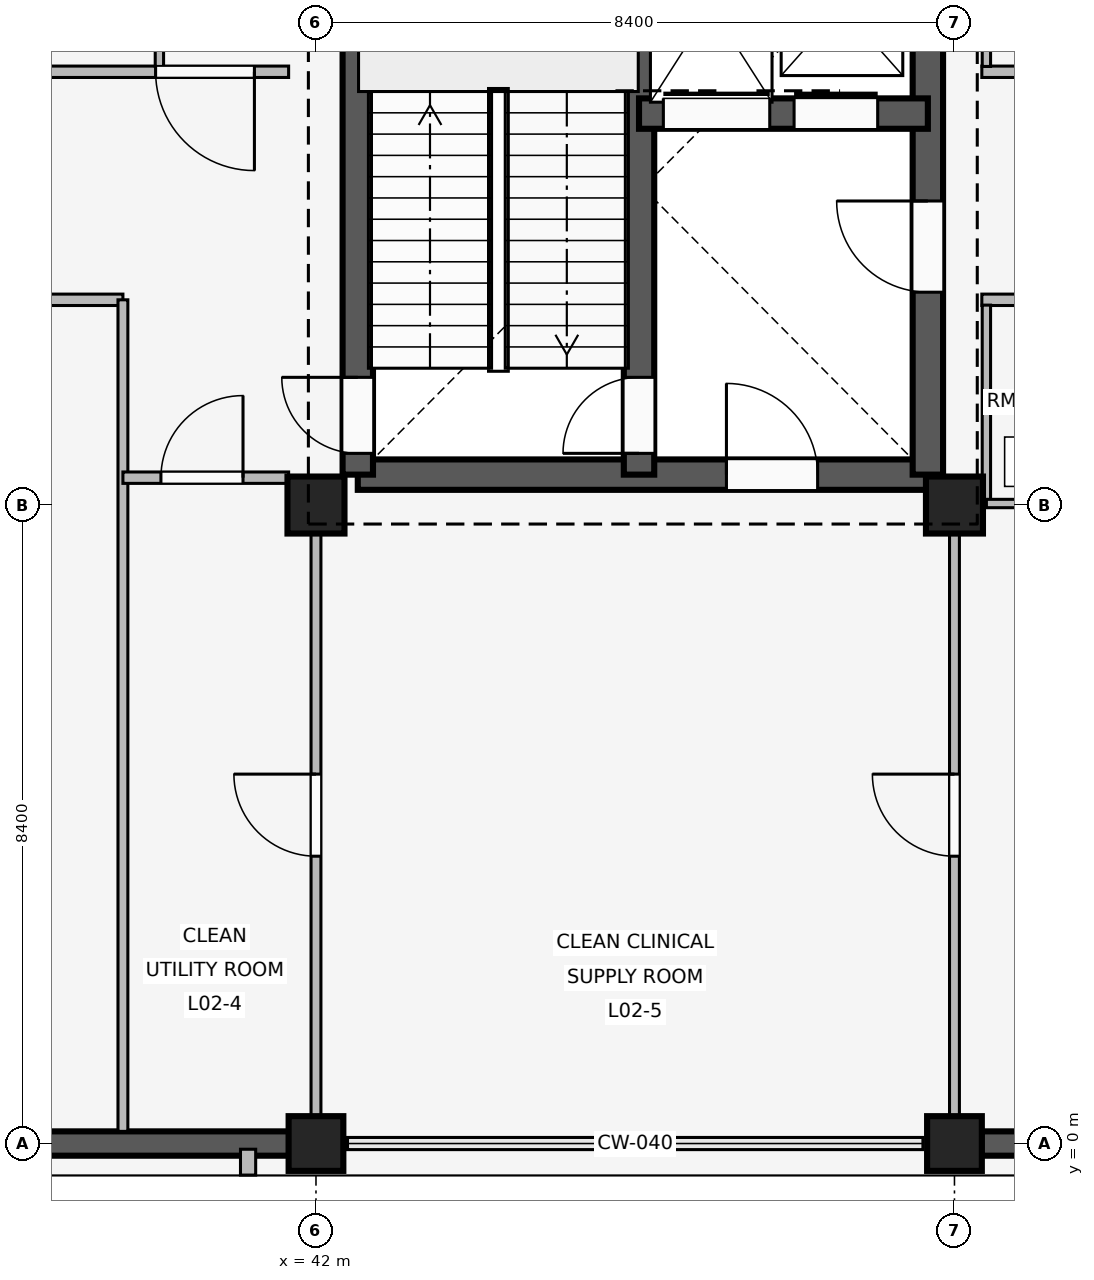
"""IFC4 building model, lengths in metres.
Left out: names, types, materials, properties, quantities, classifications, styles, units other than length and angle.
Written with IfcOpenShell. Run it as: python <this file> out.ifc"""

import sys

from ifc_helpers import new_model, si_unit, direction, frame, frame_2d, origin, origin_2d, place, context, subcontext, project, spatial, rectangle, extrude, element, fill, save


model = new_model("IFC4")
c1 = context("Model", 3, precision=1e-05, world=origin(), true_north=direction((0.0, 1.0)))
c2 = subcontext(c1, "Body", "Model", "MODEL_VIEW")
j1 = project(units=[si_unit("LENGTHUNIT", "METRE"), si_unit("PLANEANGLEUNIT", "RADIAN")], contexts=[c1])
p1 = place(None, origin())
s1 = spatial("IfcSite", under=j1, at=p1, CompositionType="ELEMENT")
p2 = place(p1, origin())
s2 = spatial("IfcBuilding", under=s1, at=p2, CompositionType="ELEMENT")
p3 = place(p2, frame((0.0, 0.0, 8.1)))
s3 = spatial("IfcBuildingStorey", under=s2, at=p3, CompositionType="ELEMENT", Elevation=8.1)
p4 = place(p3, frame((42.0, 0.0, 0.0), z_axis=(0.0, 0.0, 1.0), x_axis=(1.0, 0.0, 0.0)))
e1 = element("IfcColumn", 1, at=p4, inside=s3, PredefinedType="COLUMN", context=c2, shape_type="SweptSolid", body=[
    extrude(rectangle(XDim=0.72, YDim=0.72, at=origin_2d()), origin(), (0.0, 0.0, 1.0), 4.8),
])
p5 = place(p3, frame((42.0, 8.4, 0.0), z_axis=(0.0, 0.0, 1.0), x_axis=(1.0, 0.0, 0.0)))
e2 = element("IfcColumn", 2, at=p5, inside=s3, PredefinedType="COLUMN", context=c2, shape_type="SweptSolid", body=[
    extrude(rectangle(XDim=0.75, YDim=0.75, at=origin_2d()), origin(), (0.0, 0.0, 1.0), 4.8),
])
p6 = place(p3, frame((50.4, 0.0, 0.0), z_axis=(0.0, 0.0, 1.0), x_axis=(1.0, 0.0, 0.0)))
e3 = element("IfcColumn", 3, at=p6, inside=s3, PredefinedType="COLUMN", context=c2, shape_type="SweptSolid", body=[
    extrude(rectangle(XDim=0.72, YDim=0.72, at=origin_2d()), origin(), (0.0, 0.0, 1.0), 4.8),
])
p7 = place(p3, frame((50.4, 8.4, 0.0), z_axis=(0.0, 0.0, 1.0), x_axis=(1.0, 0.0, 0.0)))
e4 = element("IfcColumn", 4, at=p7, inside=s3, PredefinedType="COLUMN", context=c2, shape_type="SweptSolid", body=[
    extrude(rectangle(XDim=0.75, YDim=0.75, at=origin_2d()), origin(), (0.0, 0.0, 1.0), 4.8),
])
p8 = place(p3, frame((41.645, 0.0, 0.0), z_axis=(0.0, 0.0, 1.0), x_axis=(-1.0, 0.0, 0.0)))
e5 = element("IfcWall", 5, at=p8, inside=s3, PredefinedType="SOLIDWALL", context=c2, shape_type="SweptSolid", body=[
    extrude(rectangle(XDim=7.69, YDim=0.32, at=frame_2d((3.845, 0.0))), origin(), (0.0, 0.0, 1.0), 3.86),
])
p9 = place(p8, frame((5.091, 0.0, 0.85)))
e6 = element("IfcOpeningElement", 6, at=p9, cuts=e5, PredefinedType="OPENING", context=c2, shape_type="SweptSolid", body=[
    extrude(rectangle(XDim=1.66, YDim=1.95, at=frame_2d((0.83, 0.975))), frame((0.0, 0.17, 0.0), z_axis=(0.0, -1.0, 0.0), x_axis=(1.0, 0.0, 0.0)), (0.0, 0.0, 1.0), 0.34),
])
p10 = place(p3, frame((41.107, -0.075, 0.0), z_axis=(0.0, 0.0, 1.0), x_axis=(0.0, -1.0, 0.0)))
e7 = element("IfcWall", 7, at=p10, inside=s3, PredefinedType="ELEMENTEDWALL", context=c2, shape_type="SweptSolid", body=[
    extrude(rectangle(XDim=0.34, YDim=0.2, at=frame_2d((0.17, 0.0))), origin(), (0.0, 0.0, 1.0), 3.84),
])
p11 = place(p3, frame((58.445, 0.0, 0.0), z_axis=(0.0, 0.0, 1.0), x_axis=(-1.0, 0.0, 0.0)))
e8 = element("IfcWall", 8, at=p11, inside=s3, PredefinedType="SOLIDWALL", context=c2, shape_type="SweptSolid", body=[
    extrude(rectangle(XDim=7.69, YDim=0.32, at=frame_2d((3.845, 0.0))), origin(), (0.0, 0.0, 1.0), 3.86),
])
p12 = place(p11, frame((0.929, 0.0, 0.85)))
e9 = element("IfcOpeningElement", 9, at=p12, cuts=e8, PredefinedType="OPENING", context=c2, shape_type="SweptSolid", body=[
    extrude(rectangle(XDim=1.68, YDim=2.05, at=frame_2d((0.84, 1.025))), frame((0.0, 0.17, 0.0), z_axis=(0.0, -1.0, 0.0), x_axis=(1.0, 0.0, 0.0)), (0.0, 0.0, 1.0), 0.34),
])
p13 = place(p11, frame((5.081, 0.0, 0.85)))
e10 = element("IfcOpeningElement", 10, at=p13, cuts=e8, PredefinedType="OPENING", context=c2, shape_type="SweptSolid", body=[
    extrude(rectangle(XDim=1.68, YDim=2.05, at=frame_2d((0.84, 1.025))), frame((0.0, 0.17, 0.0), z_axis=(0.0, -1.0, 0.0), x_axis=(1.0, 0.0, 0.0)), (0.0, 0.0, 1.0), 0.34),
])
p14 = place(p3, frame((42.55, 8.8, 0.0), z_axis=(0.0, 0.0, 1.0), x_axis=(1.0, 0.0, 0.0)))
e11 = element("IfcWall", 11, at=p14, inside=s3, PredefinedType="SHEAR", context=c2, shape_type="SweptSolid", body=[
    extrude(rectangle(XDim=7.5, YDim=0.4, at=frame_2d((3.75, 0.0))), origin(), (0.0, 0.0, 1.0), 4.52),
])
p15 = place(p14, frame((4.85, 0.0, 0.0)))
e12 = element("IfcOpeningElement", 12, at=p15, cuts=e11, PredefinedType="OPENING", context=c2, shape_type="SweptSolid", body=[
    extrude(rectangle(XDim=1.2, YDim=2.2, at=frame_2d((0.6, 1.1))), frame((0.0, 0.21, 0.0), z_axis=(0.0, -1.0, 0.0), x_axis=(1.0, 0.0, 0.0)), (0.0, 0.0, 1.0), 0.42),
])
p16 = place(p3, frame((42.55, 8.8, 0.0), z_axis=(0.0, 0.0, 1.0), x_axis=(0.0, 1.0, 0.0)))
e13 = element("IfcWall", 13, at=p16, inside=s3, PredefinedType="SHEAR", context=c2, shape_type="SweptSolid", body=[
    extrude(rectangle(XDim=7.55, YDim=0.4, at=frame_2d((3.775, 0.0))), origin(), (0.0, 0.0, 1.0), 4.52),
])
p17 = place(p16, frame((0.28, 0.0, 0.0)))
e14 = element("IfcOpeningElement", 14, at=p17, cuts=e13, PredefinedType="OPENING", context=c2, shape_type="SweptSolid", body=[
    extrude(rectangle(XDim=1.0, YDim=2.15, at=frame_2d((0.5, 1.075))), frame((0.0, 0.21, 0.0), z_axis=(0.0, -1.0, 0.0), x_axis=(1.0, 0.0, 0.0)), (0.0, 0.0, 1.0), 0.42),
])
p18 = place(p3, frame((50.05, 8.8, 0.0), z_axis=(0.0, 0.0, 1.0), x_axis=(0.0, 1.0, 0.0)))
e15 = element("IfcWall", 15, at=p18, inside=s3, PredefinedType="SHEAR", context=c2, shape_type="SweptSolid", body=[
    extrude(rectangle(XDim=7.55, YDim=0.4, at=frame_2d((3.775, 0.0))), origin(), (0.0, 0.0, 1.0), 4.52),
])
p19 = place(p18, frame((2.4, 0.0, 0.0)))
e16 = element("IfcOpeningElement", 16, at=p19, cuts=e15, PredefinedType="OPENING", context=c2, shape_type="SweptSolid", body=[
    extrude(rectangle(XDim=1.2, YDim=2.2, at=frame_2d((0.6, 1.1))), frame((0.0, 0.21, 0.0), z_axis=(0.0, -1.0, 0.0), x_axis=(1.0, 0.0, 0.0)), (0.0, 0.0, 1.0), 0.42),
])
p20 = place(p3, frame((46.25, 8.8, 0.0), z_axis=(0.0, 0.0, 1.0), x_axis=(0.0, 1.0, 0.0)))
e17 = element("IfcWall", 17, at=p20, inside=s3, PredefinedType="SHEAR", context=c2, shape_type="SweptSolid", body=[
    extrude(rectangle(XDim=7.55, YDim=0.4, at=frame_2d((3.775, 0.0))), origin(), (0.0, 0.0, 1.0), 4.52),
])
p21 = place(p20, frame((0.28, 0.0, 0.0)))
e18 = element("IfcOpeningElement", 18, at=p21, cuts=e17, PredefinedType="OPENING", context=c2, shape_type="SweptSolid", body=[
    extrude(rectangle(XDim=1.0, YDim=2.15, at=frame_2d((0.5, 1.075))), frame((0.0, 0.21, 0.0), z_axis=(0.0, -1.0, 0.0), x_axis=(1.0, 0.0, 0.0)), (0.0, 0.0, 1.0), 0.42),
])
p22 = place(p3, frame((46.25, 13.55, 0.0), z_axis=(0.0, 0.0, 1.0), x_axis=(1.0, 0.0, 0.0)))
e19 = element("IfcWall", 19, at=p22, inside=s3, PredefinedType="SHEAR", context=c2, shape_type="SweptSolid", body=[
    extrude(rectangle(XDim=3.8, YDim=0.4, at=frame_2d((1.9, 0.0))), origin(), (0.0, 0.0, 1.0), 4.52),
])
p23 = place(p22, frame((0.32, 0.0, 0.0)))
e20 = element("IfcOpeningElement", 20, at=p23, cuts=e19, PredefinedType="OPENING", context=c2, shape_type="SweptSolid", body=[
    extrude(rectangle(XDim=1.4, YDim=2.25, at=frame_2d((0.7, 1.125))), frame((0.0, 0.21, 0.0), z_axis=(0.0, -1.0, 0.0), x_axis=(1.0, 0.0, 0.0)), (0.0, 0.0, 1.0), 0.42),
])
p24 = place(p22, frame((2.04, 0.0, 0.0)))
e21 = element("IfcOpeningElement", 21, at=p24, cuts=e19, PredefinedType="OPENING", context=c2, shape_type="SweptSolid", body=[
    extrude(rectangle(XDim=1.1, YDim=2.15, at=frame_2d((0.55, 1.075))), frame((0.0, 0.21, 0.0), z_axis=(0.0, -1.0, 0.0), x_axis=(1.0, 0.0, 0.0)), (0.0, 0.0, 1.0), 0.42),
])
p25 = place(p3, frame((33.68, 11.1, 0.0), z_axis=(0.0, 0.0, 1.0), x_axis=(1.0, 0.0, 0.0)))
e22 = element("IfcWall", 22, at=p25, inside=s3, PredefinedType="PARTITIONING", context=c2, shape_type="SweptSolid", body=[
    extrude(rectangle(XDim=5.78, YDim=0.15, at=frame_2d((2.89, 0.0))), origin(), (0.0, 0.0, 1.0), 3.84),
])
p26 = place(p25, frame((2.38, 0.0, 0.0)))
e23 = element("IfcOpeningElement", 23, at=p26, cuts=e22, PredefinedType="OPENING", context=c2, shape_type="SweptSolid", body=[
    extrude(rectangle(XDim=1.25, YDim=2.2, at=frame_2d((0.625, 1.1))), frame((0.0, 0.085, 0.0), z_axis=(0.0, -1.0, 0.0), x_axis=(1.0, 0.0, 0.0)), (0.0, 0.0, 1.0), 0.17),
])
p27 = place(p3, frame((39.46, 0.16, 0.0), z_axis=(0.0, 0.0, 1.0), x_axis=(0.0, 1.0, 0.0)))
e24 = element("IfcWall", 24, at=p27, inside=s3, PredefinedType="PARTITIONING", context=c2, shape_type="SweptSolid", body=[
    extrude(rectangle(XDim=10.94, YDim=0.13, at=frame_2d((5.47, 0.0))), origin(), (0.0, 0.0, 1.0), 3.84),
])
p28 = place(p3, frame((39.46, 8.76, 0.0), z_axis=(0.0, 0.0, 1.0), x_axis=(1.0, 0.0, 0.0)))
e25 = element("IfcWall", 25, at=p28, inside=s3, PredefinedType="PARTITIONING", context=c2, shape_type="SweptSolid", body=[
    extrude(rectangle(XDim=2.18, YDim=0.15, at=frame_2d((1.09, 0.0))), origin(), (0.0, 0.0, 1.0), 3.84),
])
p29 = place(p28, frame((0.5, 0.0, 0.0)))
e26 = element("IfcOpeningElement", 26, at=p29, cuts=e25, PredefinedType="OPENING", context=c2, shape_type="SweptSolid", body=[
    extrude(rectangle(XDim=1.08, YDim=2.15, at=frame_2d((0.54, 1.075))), frame((0.0, 0.085, 0.0), z_axis=(0.0, -1.0, 0.0), x_axis=(1.0, 0.0, 0.0)), (0.0, 0.0, 1.0), 0.17),
])
p30 = place(p3, frame((41.64, 14.1, 0.0), z_axis=(0.0, 0.0, 1.0), x_axis=(-1.0, 0.0, 0.0)))
e27 = element("IfcWall", 27, at=p30, inside=s3, PredefinedType="PARTITIONING", context=c2, shape_type="SweptSolid", body=[
    extrude(rectangle(XDim=7.96, YDim=0.15, at=frame_2d((3.98, 0.0))), origin(), (0.0, 0.0, 1.0), 3.84),
])
p31 = place(p30, frame((0.45, 0.0, 0.0)))
e28 = element("IfcOpeningElement", 28, at=p31, cuts=e27, PredefinedType="OPENING", context=c2, shape_type="SweptSolid", body=[
    extrude(rectangle(XDim=1.3, YDim=2.25, at=frame_2d((0.65, 1.125))), frame((0.0, 0.085, 0.0), z_axis=(0.0, -1.0, 0.0), x_axis=(1.0, 0.0, 0.0)), (0.0, 0.0, 1.0), 0.17),
])
p32 = place(p30, frame((4.15, 0.0, 0.0)))
e29 = element("IfcOpeningElement", 29, at=p32, cuts=e27, PredefinedType="OPENING", context=c2, shape_type="SweptSolid", body=[
    extrude(rectangle(XDim=1.3, YDim=2.25, at=frame_2d((0.65, 1.125))), frame((0.0, 0.085, 0.0), z_axis=(0.0, -1.0, 0.0), x_axis=(1.0, 0.0, 0.0)), (0.0, 0.0, 1.0), 0.17),
])
p33 = place(p3, frame((39.94, 14.17, 0.0), z_axis=(0.0, 0.0, 1.0), x_axis=(0.0, 1.0, 0.0)))
e30 = element("IfcWall", 30, at=p33, inside=s3, PredefinedType="PARTITIONING", context=c2, shape_type="SweptSolid", body=[
    extrude(rectangle(XDim=2.61, YDim=0.11, at=frame_2d((1.305, 0.0))), origin(), (0.0, 0.0, 1.0), 3.84),
])
p34 = place(p3, frame((42.0, 0.14, 0.0), z_axis=(0.0, 0.0, 1.0), x_axis=(0.0, 1.0, 0.0)))
e31 = element("IfcWall", 31, at=p34, inside=s3, PredefinedType="PARTITIONING", context=c2, shape_type="SweptSolid", body=[
    extrude(rectangle(XDim=8.21, YDim=0.13, at=frame_2d((4.105, 0.0))), origin(), (0.0, 0.0, 1.0), 3.84),
])
p35 = place(p34, frame((3.64, 0.0, 0.0)))
e32 = element("IfcOpeningElement", 32, at=p35, cuts=e31, PredefinedType="OPENING", context=c2, shape_type="SweptSolid", body=[
    extrude(rectangle(XDim=1.08, YDim=2.15, at=frame_2d((0.54, 1.075))), frame((0.0, 0.075, 0.0), z_axis=(0.0, -1.0, 0.0), x_axis=(1.0, 0.0, 0.0)), (0.0, 0.0, 1.0), 0.15),
])
p36 = place(p3, frame((50.4, 0.14, 0.0), z_axis=(0.0, 0.0, 1.0), x_axis=(0.0, 1.0, 0.0)))
e33 = element("IfcWall", 33, at=p36, inside=s3, PredefinedType="PARTITIONING", context=c2, shape_type="SweptSolid", body=[
    extrude(rectangle(XDim=8.21, YDim=0.13, at=frame_2d((4.105, 0.0))), origin(), (0.0, 0.0, 1.0), 3.84),
])
p37 = place(p36, frame((3.64, 0.0, 0.0)))
e34 = element("IfcOpeningElement", 34, at=p37, cuts=e33, PredefinedType="OPENING", context=c2, shape_type="SweptSolid", body=[
    extrude(rectangle(XDim=1.08, YDim=2.15, at=frame_2d((0.54, 1.075))), frame((0.0, 0.075, 0.0), z_axis=(0.0, -1.0, 0.0), x_axis=(1.0, 0.0, 0.0)), (0.0, 0.0, 1.0), 0.15),
])
p38 = place(p3, frame((50.76, 11.1, 0.0), z_axis=(0.0, 0.0, 1.0), x_axis=(1.0, 0.0, 0.0)))
e35 = element("IfcWall", 35, at=p38, inside=s3, PredefinedType="PARTITIONING", context=c2, shape_type="SweptSolid", body=[
    extrude(rectangle(XDim=7.96, YDim=0.15, at=frame_2d((3.98, 0.0))), origin(), (0.0, 0.0, 1.0), 3.84),
])
p39 = place(p38, frame((2.25, 0.0, 0.0)))
e36 = element("IfcOpeningElement", 36, at=p39, cuts=e35, PredefinedType="OPENING", context=c2, shape_type="SweptSolid", body=[
    extrude(rectangle(XDim=1.3, YDim=2.25, at=frame_2d((0.65, 1.125))), frame((0.0, 0.085, 0.0), z_axis=(0.0, -1.0, 0.0), x_axis=(1.0, 0.0, 0.0)), (0.0, 0.0, 1.0), 0.17),
])
p40 = place(p38, frame((5.95, 0.0, 0.0)))
e37 = element("IfcOpeningElement", 37, at=p40, cuts=e35, PredefinedType="OPENING", context=c2, shape_type="SweptSolid", body=[
    extrude(rectangle(XDim=1.3, YDim=2.25, at=frame_2d((0.65, 1.125))), frame((0.0, 0.085, 0.0), z_axis=(0.0, -1.0, 0.0), x_axis=(1.0, 0.0, 0.0)), (0.0, 0.0, 1.0), 0.17),
])
p41 = place(p3, frame((50.82, 8.42, 0.0), z_axis=(0.0, 0.0, 1.0), x_axis=(0.0, 1.0, 0.0)))
e38 = element("IfcWall", 38, at=p41, inside=s3, PredefinedType="PARTITIONING", context=c2, shape_type="SweptSolid", body=[
    extrude(rectangle(XDim=2.61, YDim=0.11, at=frame_2d((1.305, 0.0))), origin(), (0.0, 0.0, 1.0), 3.84),
])
p42 = place(p3, frame((50.82, 8.42, 0.0), z_axis=(0.0, 0.0, 1.0), x_axis=(1.0, 0.0, 0.0)))
e39 = element("IfcWall", 39, at=p42, inside=s3, PredefinedType="PARTITIONING", context=c2, shape_type="SweptSolid", body=[
    extrude(rectangle(XDim=1.98, YDim=0.11, at=frame_2d((0.99, 0.0))), origin(), (0.0, 0.0, 1.0), 3.84),
])
p43 = place(p42, frame((0.54, 0.0, 0.0)))
e40 = element("IfcOpeningElement", 40, at=p43, cuts=e39, PredefinedType="OPENING", context=c2, shape_type="SweptSolid", body=[
    extrude(rectangle(XDim=0.9, YDim=2.1, at=frame_2d((0.45, 1.05))), frame((0.0, 0.065, 0.0), z_axis=(0.0, -1.0, 0.0), x_axis=(1.0, 0.0, 0.0)), (0.0, 0.0, 1.0), 0.13),
])
p44 = place(p3, frame((58.72, 14.1, 0.0), z_axis=(0.0, 0.0, 1.0), x_axis=(-1.0, 0.0, 0.0)))
e41 = element("IfcWall", 41, at=p44, inside=s3, PredefinedType="PARTITIONING", context=c2, shape_type="SweptSolid", body=[
    extrude(rectangle(XDim=7.96, YDim=0.15, at=frame_2d((3.98, 0.0))), origin(), (0.0, 0.0, 1.0), 3.84),
])
p45 = place(p44, frame((0.73, 0.0, 0.0)))
e42 = element("IfcOpeningElement", 42, at=p45, cuts=e41, PredefinedType="OPENING", context=c2, shape_type="SweptSolid", body=[
    extrude(rectangle(XDim=1.3, YDim=2.25, at=frame_2d((0.65, 1.125))), frame((0.0, 0.085, 0.0), z_axis=(0.0, -1.0, 0.0), x_axis=(1.0, 0.0, 0.0)), (0.0, 0.0, 1.0), 0.17),
])
p46 = place(p44, frame((4.43, 0.0, 0.0)))
e43 = element("IfcOpeningElement", 43, at=p46, cuts=e41, PredefinedType="OPENING", context=c2, shape_type="SweptSolid", body=[
    extrude(rectangle(XDim=1.3, YDim=2.25, at=frame_2d((0.65, 1.125))), frame((0.0, 0.085, 0.0), z_axis=(0.0, -1.0, 0.0), x_axis=(1.0, 0.0, 0.0)), (0.0, 0.0, 1.0), 0.17),
])
p47 = place(p3, frame((50.82, 14.17, 0.0), z_axis=(0.0, 0.0, 1.0), x_axis=(0.0, 1.0, 0.0)))
e44 = element("IfcWall", 44, at=p47, inside=s3, PredefinedType="PARTITIONING", context=c2, shape_type="SweptSolid", body=[
    extrude(rectangle(XDim=2.61, YDim=0.11, at=frame_2d((1.305, 0.0))), origin(), (0.0, 0.0, 1.0), 3.84),
])
p48 = place(p19, origin())
e45 = element("IfcDoor", 45, at=p48, inside=s3, OperationType="SINGLE_SWING_RIGHT", PredefinedType="DOOR", context=c2, shape_type="SweptSolid", body=[
    extrude(rectangle(XDim=1.2, YDim=2.2, at=frame_2d((0.6, 1.1))), frame((0.0, 0.025, 0.0), z_axis=(0.0, -1.0, 0.0), x_axis=(1.0, 0.0, 0.0)), (0.0, 0.0, 1.0), 0.05),
])
fill(e16, e45)
p49 = place(p15, origin())
e46 = element("IfcDoor", 46, at=p49, inside=s3, OperationType="SINGLE_SWING_LEFT", PredefinedType="DOOR", context=c2, shape_type="SweptSolid", body=[
    extrude(rectangle(XDim=1.2, YDim=2.2, at=frame_2d((0.6, 1.1))), frame((0.0, 0.025, 0.0), z_axis=(0.0, -1.0, 0.0), x_axis=(1.0, 0.0, 0.0)), (0.0, 0.0, 1.0), 0.05),
])
fill(e12, e46)
p50 = place(p17, origin())
e47 = element("IfcDoor", 47, at=p50, inside=s3, OperationType="SINGLE_SWING_RIGHT", PredefinedType="DOOR", context=c2, shape_type="SweptSolid", body=[
    extrude(rectangle(XDim=1.0, YDim=2.15, at=frame_2d((0.5, 1.075))), frame((0.0, 0.025, 0.0), z_axis=(0.0, -1.0, 0.0), x_axis=(1.0, 0.0, 0.0)), (0.0, 0.0, 1.0), 0.05),
])
fill(e14, e47)
p51 = place(p21, origin())
e48 = element("IfcDoor", 48, at=p51, inside=s3, OperationType="SINGLE_SWING_LEFT", PredefinedType="DOOR", context=c2, shape_type="SweptSolid", body=[
    extrude(rectangle(XDim=1.0, YDim=2.15, at=frame_2d((0.5, 1.075))), frame((0.0, 0.025, 0.0), z_axis=(0.0, -1.0, 0.0), x_axis=(1.0, 0.0, 0.0)), (0.0, 0.0, 1.0), 0.05),
])
fill(e18, e48)
p52 = place(p23, origin())
e49 = element("IfcDoor", 49, at=p52, inside=s3, OperationType="SLIDING_TO_LEFT", PredefinedType="DOOR", context=c2, shape_type="SweptSolid", body=[
    extrude(rectangle(XDim=1.4, YDim=2.25, at=frame_2d((0.7, 1.125))), frame((0.0, 0.025, 0.0), z_axis=(0.0, -1.0, 0.0), x_axis=(1.0, 0.0, 0.0)), (0.0, 0.0, 1.0), 0.05),
])
fill(e20, e49)
p53 = place(p24, origin())
e50 = element("IfcDoor", 50, at=p53, inside=s3, OperationType="SLIDING_TO_LEFT", PredefinedType="DOOR", context=c2, shape_type="SweptSolid", body=[
    extrude(rectangle(XDim=1.1, YDim=2.15, at=frame_2d((0.55, 1.075))), frame((0.0, 0.025, 0.0), z_axis=(0.0, -1.0, 0.0), x_axis=(1.0, 0.0, 0.0)), (0.0, 0.0, 1.0), 0.05),
])
fill(e21, e50)
p54 = place(p29, origin())
e51 = element("IfcDoor", 51, at=p54, inside=s3, OperationType="SINGLE_SWING_RIGHT", PredefinedType="DOOR", context=c2, shape_type="SweptSolid", body=[
    extrude(rectangle(XDim=1.08, YDim=2.15, at=frame_2d((0.54, 1.075))), frame((0.0, 0.025, 0.0), z_axis=(0.0, -1.0, 0.0), x_axis=(1.0, 0.0, 0.0)), (0.0, 0.0, 1.0), 0.05),
])
fill(e26, e51)
p55 = place(p31, origin())
e52 = element("IfcDoor", 52, at=p55, inside=s3, OperationType="SINGLE_SWING_LEFT", PredefinedType="DOOR", context=c2, shape_type="SweptSolid", body=[
    extrude(rectangle(XDim=1.3, YDim=2.25, at=frame_2d((0.65, 1.125))), frame((0.0, 0.025, 0.0), z_axis=(0.0, -1.0, 0.0), x_axis=(1.0, 0.0, 0.0)), (0.0, 0.0, 1.0), 0.05),
])
fill(e28, e52)
p56 = place(p35, origin())
e53 = element("IfcDoor", 53, at=p56, inside=s3, OperationType="SINGLE_SWING_RIGHT", PredefinedType="DOOR", context=c2, shape_type="SweptSolid", body=[
    extrude(rectangle(XDim=1.08, YDim=2.15, at=frame_2d((0.54, 1.075))), frame((0.0, 0.025, 0.0), z_axis=(0.0, -1.0, 0.0), x_axis=(1.0, 0.0, 0.0)), (0.0, 0.0, 1.0), 0.05),
])
fill(e32, e53)
p57 = place(p37, origin())
e54 = element("IfcDoor", 54, at=p57, inside=s3, OperationType="SINGLE_SWING_RIGHT", PredefinedType="DOOR", context=c2, shape_type="SweptSolid", body=[
    extrude(rectangle(XDim=1.08, YDim=2.15, at=frame_2d((0.54, 1.075))), frame((0.0, 0.025, 0.0), z_axis=(0.0, -1.0, 0.0), x_axis=(1.0, 0.0, 0.0)), (0.0, 0.0, 1.0), 0.05),
])
fill(e34, e54)
save(model, sys.argv[1])
